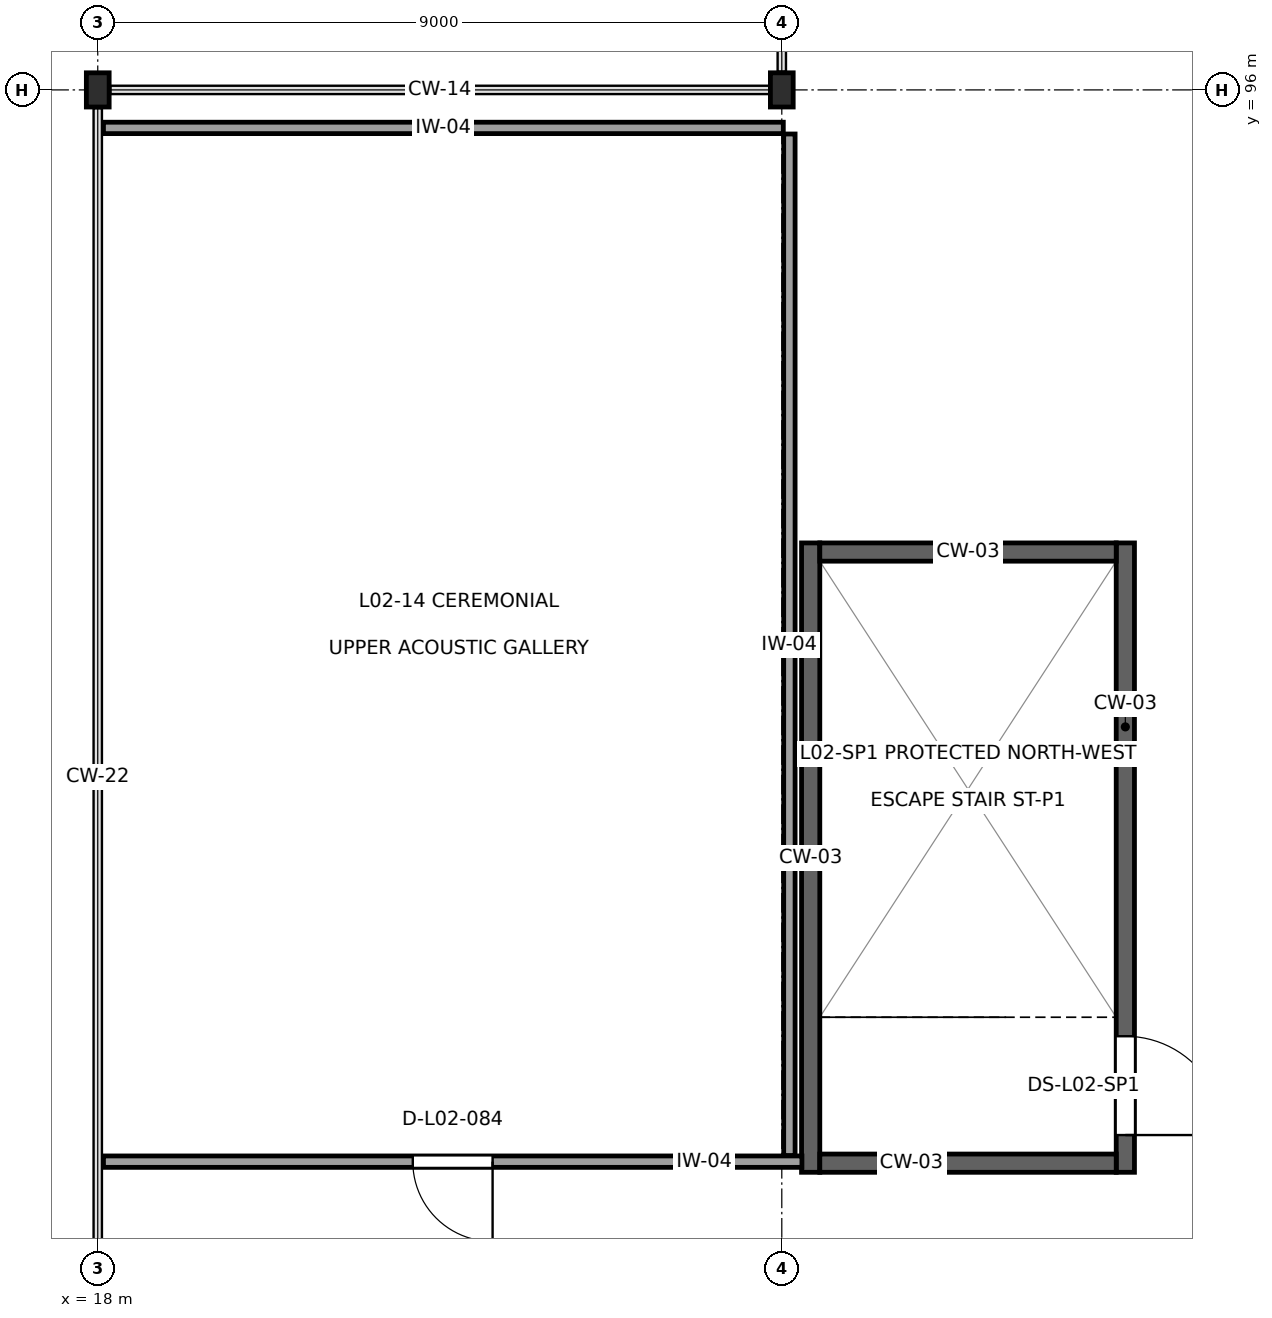
"""IFC4 building model, lengths in metres.
Left out: names, types, materials, properties, quantities, classifications, styles, units other than length and angle.
Written with IfcOpenShell. Run it as: python <this file> out.ifc"""

import sys

from ifc_helpers import new_model, si_unit, direction, frame, frame_2d, origin, origin_2d, place, context, subcontext, project, spatial, rectangle, i_section, extrude, element, fill, save


model = new_model("IFC4")
c1 = context("Model", 3, precision=1e-05, world=origin(), true_north=direction((0.0, 1.0)))
c2 = subcontext(c1, "Body", "Model", "MODEL_VIEW")
j1 = project(units=[si_unit("LENGTHUNIT", "METRE"), si_unit("PLANEANGLEUNIT", "RADIAN")], contexts=[c1])
p1 = place(None, origin())
s1 = spatial("IfcSite", under=j1, at=p1, CompositionType="ELEMENT")
p2 = place(p1, origin())
s2 = spatial("IfcBuilding", under=s1, at=p2, CompositionType="ELEMENT")
p3 = place(p2, frame((0.0, 0.0, 9.9)))
s3 = spatial("IfcBuildingStorey", under=s2, at=p3, CompositionType="ELEMENT", Elevation=9.9)
p4 = place(p3, frame((18.0, 96.0, 0.0), z_axis=(0.0, 0.0, 1.0), x_axis=(1.0, 0.0, 0.0)))
e1 = element("IfcColumn", 1, at=p4, inside=s3, PredefinedType="COLUMN", context=c2, shape_type="SweptSolid", body=[
    extrude(i_section(OverallWidth=0.3, OverallDepth=0.45, WebThickness=0.014, FlangeThickness=0.026, at=origin_2d()), origin(), (0.0, 0.0, 1.0), 4.5),
])
p5 = place(p3, frame((27.0, 96.0, 0.0), z_axis=(0.0, 0.0, 1.0), x_axis=(1.0, 0.0, 0.0)))
e2 = element("IfcColumn", 2, at=p5, inside=s3, PredefinedType="COLUMN", context=c2, shape_type="SweptSolid", body=[
    extrude(i_section(OverallWidth=0.3, OverallDepth=0.45, WebThickness=0.014, FlangeThickness=0.026, at=origin_2d()), origin(), (0.0, 0.0, 1.0), 4.3),
])
p6 = place(p3, frame((27.38, 81.76, 0.0), z_axis=(0.0, 0.0, 1.0), x_axis=(0.0, 1.0, 0.0)))
e3 = element("IfcWall", 3, at=p6, inside=s3, PredefinedType="SHEAR", context=c2, shape_type="SweptSolid", body=[
    extrude(rectangle(XDim=8.28, YDim=0.24, at=frame_2d((4.14, 0.0))), origin(), (0.0, 0.0, 1.0), 4.31),
])
p7 = place(p3, frame((31.52, 81.76, 0.0), z_axis=(0.0, 0.0, 1.0), x_axis=(0.0, 1.0, 0.0)))
e4 = element("IfcWall", 4, at=p7, inside=s3, PredefinedType="SHEAR", context=c2, shape_type="SweptSolid", body=[
    extrude(rectangle(XDim=8.28, YDim=0.24, at=frame_2d((4.14, 0.0))), origin(), (0.0, 0.0, 1.0), 4.31),
])
p8 = place(p7, frame((0.49, 0.0, 0.0)))
e5 = element("IfcOpeningElement", 5, at=p8, cuts=e4, PredefinedType="OPENING", context=c2, shape_type="SweptSolid", body=[
    extrude(rectangle(XDim=1.3, YDim=2.2, at=frame_2d((0.65, 1.1))), frame((0.0, 0.135, 0.0), z_axis=(0.0, -1.0, 0.0), x_axis=(1.0, 0.0, 0.0)), (0.0, 0.0, 1.0), 0.27),
])
for number, where, z_axis, x_axis in (
    (6, (27.5, 81.88, 0.0), (0.0, 0.0, 1.0), (1.0, 0.0, 0.0)),
    (7, (27.5, 89.92, 0.0), (0.0, 0.0, 1.0), (1.0, 0.0, 0.0)),
):
    element("IfcWall", number, at=place(p3, frame(where, z_axis=z_axis, x_axis=x_axis)), inside=s3, PredefinedType="SHEAR", context=c2, shape_type="SweptSolid", body=[
        extrude(rectangle(XDim=3.9, YDim=0.24, at=frame_2d((1.95, 0.0))), origin(), (0.0, 0.0, 1.0), 4.31),
    ])
p9 = place(p3, frame((27.1, 95.42, 0.0), z_axis=(0.0, 0.0, 1.0), x_axis=(0.0, -1.0, 0.0)))
e8 = element("IfcWall", 8, at=p9, inside=s3, PredefinedType="PARTITIONING", context=c2, shape_type="SweptSolid", body=[
    extrude(rectangle(XDim=13.44, YDim=0.15, at=frame_2d((6.72, 0.0))), origin(), (0.0, 0.0, 1.0), 4.14),
])
p10 = place(p3, frame((27.265, 81.9, 0.0), z_axis=(0.0, 0.0, 1.0), x_axis=(-1.0, 0.0, 0.0)))
e9 = element("IfcWall", 9, at=p10, inside=s3, PredefinedType="PARTITIONING", context=c2, shape_type="SweptSolid", body=[
    extrude(rectangle(XDim=9.19, YDim=0.15, at=frame_2d((4.595, 0.0))), origin(), (0.0, 0.0, 1.0), 4.14),
])
p11 = place(p10, frame((4.07, 0.0, 0.0)))
e10 = element("IfcOpeningElement", 10, at=p11, cuts=e9, PredefinedType="OPENING", context=c2, shape_type="SweptSolid", body=[
    extrude(rectangle(XDim=1.05, YDim=2.25, at=frame_2d((0.525, 1.125))), frame((0.0, 0.09, 0.0), z_axis=(0.0, -1.0, 0.0), x_axis=(1.0, 0.0, 0.0)), (0.0, 0.0, 1.0), 0.18),
])
p12 = place(p3, frame((18.075, 95.5, 0.0), z_axis=(0.0, 0.0, 1.0), x_axis=(1.0, 0.0, 0.0)))
e11 = element("IfcWall", 11, at=p12, inside=s3, PredefinedType="PARTITIONING", context=c2, shape_type="SweptSolid", body=[
    extrude(rectangle(XDim=8.945, YDim=0.15, at=frame_2d((4.473, 0.0))), origin(), (0.0, 0.0, 1.0), 4.14),
])
p13 = place(p8, frame((1.3, 0.0, 0.0), z_axis=(0.0, 0.0, 1.0), x_axis=(-1.0, 0.0, 0.0)))
e12 = element("IfcDoor", 12, at=p13, inside=s3, OperationType="SINGLE_SWING_LEFT", PredefinedType="DOOR", context=c2, shape_type="SweptSolid", body=[
    extrude(rectangle(XDim=1.3, YDim=2.2, at=frame_2d((0.65, 1.1))), frame((0.0, 0.025, 0.0), z_axis=(0.0, -1.0, 0.0), x_axis=(1.0, 0.0, 0.0)), (0.0, 0.0, 1.0), 0.05),
])
fill(e5, e12)
p14 = place(p11, origin())
e13 = element("IfcDoor", 13, at=p14, inside=s3, OperationType="SINGLE_SWING_LEFT", PredefinedType="DOOR", context=c2, shape_type="SweptSolid", body=[
    extrude(rectangle(XDim=1.05, YDim=2.25, at=frame_2d((0.525, 1.125))), frame((0.0, 0.025, 0.0), z_axis=(0.0, -1.0, 0.0), x_axis=(1.0, 0.0, 0.0)), (0.0, 0.0, 1.0), 0.05),
])
fill(e10, e13)
save(model, sys.argv[1])
